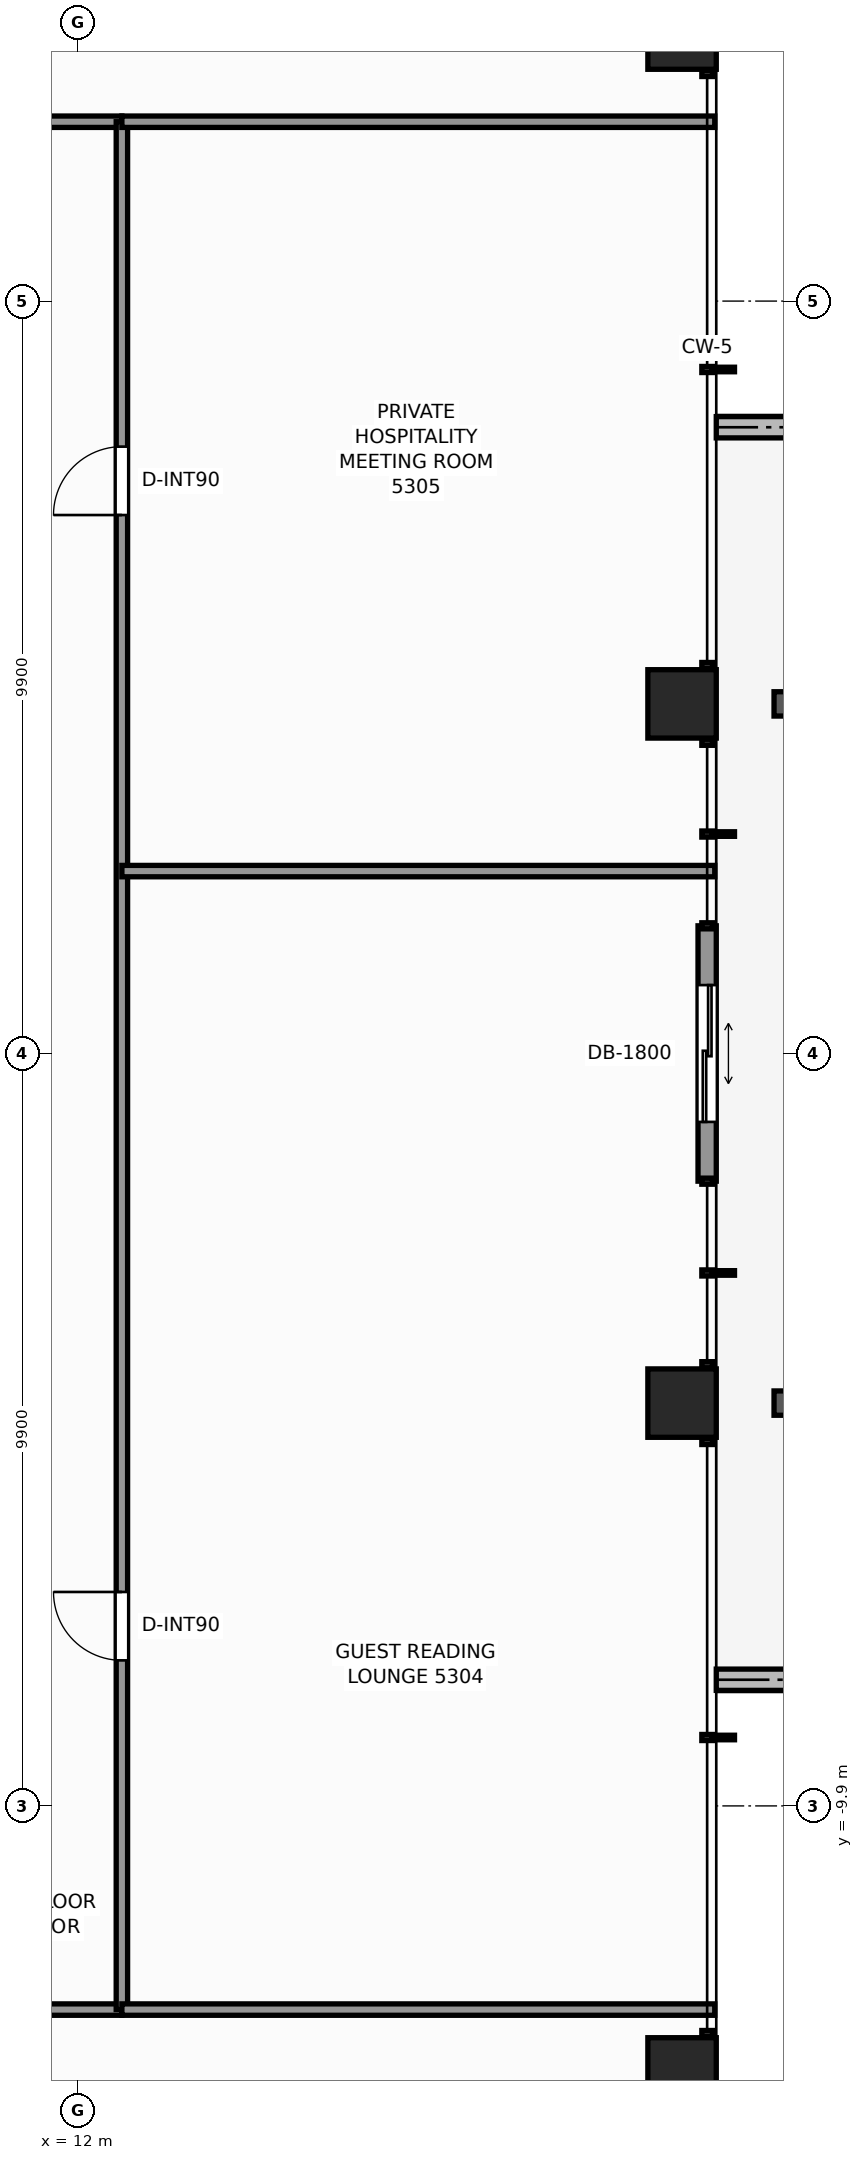
"""IFC4 building model, lengths in metres.
Left out: names, types, materials, properties, quantities, classifications, styles, units other than length and angle.
Written with IfcOpenShell. Run it as: python <this file> out.ifc"""

import sys

from ifc_helpers import new_model, si_unit, direction, frame, frame_2d, origin, origin_2d, place, context, subcontext, project, spatial, rectangle, extrude, element, fill, save


model = new_model("IFC4")
c1 = context("Model", 3, precision=1e-05, world=origin(), true_north=direction((0.0, 1.0)))
c2 = subcontext(c1, "Body", "Model", "MODEL_VIEW")
j1 = project(units=[si_unit("LENGTHUNIT", "METRE"), si_unit("PLANEANGLEUNIT", "RADIAN")], contexts=[c1])
p1 = place(None, origin())
s1 = spatial("IfcSite", under=j1, at=p1, CompositionType="ELEMENT")
p2 = place(p1, origin())
s2 = spatial("IfcBuilding", under=s1, at=p2, CompositionType="ELEMENT")
p3 = place(p2, frame((0.0, 0.0, 183.3)))
s3 = spatial("IfcBuildingStorey", under=s2, at=p3, CompositionType="ELEMENT", Elevation=183.3)
for number, where, z_axis, x_axis in (
    (1, (19.95, -13.4, 0.0), (0.0, 0.0, 1.0), (1.0, 0.0, 0.0)),
    (2, (19.95, -4.6, 0.0), (0.0, 0.0, 1.0), (1.0, 0.0, 0.0)),
    (3, (19.95, 4.6, 0.0), (0.0, 0.0, 1.0), (1.0, 0.0, 0.0)),
    (4, (19.95, 13.4, 0.0), (0.0, 0.0, 1.0), (1.0, 0.0, 0.0)),
):
    element("IfcColumn", number, at=place(p3, frame(where, z_axis=z_axis, x_axis=x_axis)), inside=s3, PredefinedType="COLUMN", context=c2, shape_type="SweptSolid", body=[
        extrude(rectangle(XDim=0.9, YDim=0.9, at=origin_2d()), origin(), (0.0, 0.0, 1.0), 3.3),
    ])
p4 = place(p3, frame((22.105, 8.24, -0.04), z_axis=(0.0, 0.0, 1.0), x_axis=(-1.0, 0.0, 0.0)))
e5 = element("IfcWall", 5, at=p4, inside=s3, PredefinedType="PARAPET", context=c2, shape_type="SweptSolid", body=[
    extrude(rectangle(XDim=1.705, YDim=0.28, at=frame_2d((0.853, 0.0))), origin(), (0.0, 0.0, 1.0), 0.42),
])
p5 = place(p3, frame((20.4, -8.24, -0.04), z_axis=(0.0, 0.0, 1.0), x_axis=(1.0, 0.0, 0.0)))
e6 = element("IfcWall", 6, at=p5, inside=s3, PredefinedType="PARAPET", context=c2, shape_type="SweptSolid", body=[
    extrude(rectangle(XDim=2.975, YDim=0.28, at=frame_2d((1.487, 0.0))), origin(), (0.0, 0.0, 1.0), 0.42),
])
p6 = place(p3, frame((20.28, 1.68, 0.0), z_axis=(0.0, 0.0, 1.0), x_axis=(0.0, -1.0, 0.0)))
e7 = element("IfcWall", 7, at=p6, inside=s3, PredefinedType="STANDARD", context=c2, shape_type="SweptSolid", body=[
    extrude(rectangle(XDim=3.36, YDim=0.24, at=frame_2d((1.68, 0.0))), origin(), (0.0, 0.0, 1.0), 3.08),
])
p7 = place(p6, frame((0.78, 0.0, 0.0)))
e8 = element("IfcOpeningElement", 8, at=p7, cuts=e7, PredefinedType="OPENING", context=c2, shape_type="SweptSolid", body=[
    extrude(rectangle(XDim=1.8, YDim=2.2, at=frame_2d((0.9, 1.1))), frame((0.0, 0.13, 0.0), z_axis=(0.0, -1.0, 0.0), x_axis=(1.0, 0.0, 0.0)), (0.0, 0.0, 1.0), 0.26),
])
p8 = place(p3, frame((-12.26, -12.58, 0.0), z_axis=(0.0, 0.0, 1.0), x_axis=(1.0, 0.0, 0.0)))
e9 = element("IfcWall", 9, at=p8, inside=s3, PredefinedType="PARTITIONING", context=c2, shape_type="SweptSolid", body=[
    extrude(rectangle(XDim=24.84, YDim=0.15, at=frame_2d((12.42, 0.0))), origin(), (0.0, 0.0, 1.0), 2.369),
])
p9 = place(p8, frame((3.203, 0.0, 0.0)))
e10 = element("IfcOpeningElement", 10, at=p9, cuts=e9, PredefinedType="OPENING", context=c2, shape_type="SweptSolid", body=[
    extrude(rectangle(XDim=0.9, YDim=2.06, at=frame_2d((0.45, 1.03))), frame((0.0, 0.085, 0.0), z_axis=(0.0, -1.0, 0.0), x_axis=(1.0, 0.0, 0.0)), (0.0, 0.0, 1.0), 0.17),
])
p10 = place(p8, frame((9.78, 0.0, 0.0)))
e11 = element("IfcOpeningElement", 11, at=p10, cuts=e9, PredefinedType="OPENING", context=c2, shape_type="SweptSolid", body=[
    extrude(rectangle(XDim=0.9, YDim=2.06, at=frame_2d((0.45, 1.03))), frame((0.0, 0.085, 0.0), z_axis=(0.0, -1.0, 0.0), x_axis=(1.0, 0.0, 0.0)), (0.0, 0.0, 1.0), 0.17),
])
p11 = place(p8, frame((19.345, 0.0, 0.0)))
e12 = element("IfcOpeningElement", 12, at=p11, cuts=e9, PredefinedType="OPENING", context=c2, shape_type="SweptSolid", body=[
    extrude(rectangle(XDim=0.9, YDim=2.06, at=frame_2d((0.45, 1.03))), frame((0.0, 0.085, 0.0), z_axis=(0.0, -1.0, 0.0), x_axis=(1.0, 0.0, 0.0)), (0.0, 0.0, 1.0), 0.17),
])
p12 = place(p3, frame((-12.26, 12.26, 0.0), z_axis=(0.0, 0.0, 1.0), x_axis=(1.0, 0.0, 0.0)))
e13 = element("IfcWall", 13, at=p12, inside=s3, PredefinedType="PARTITIONING", context=c2, shape_type="SweptSolid", body=[
    extrude(rectangle(XDim=24.84, YDim=0.15, at=frame_2d((12.42, 0.0))), origin(), (0.0, 0.0, 1.0), 2.369),
])
p13 = place(p12, frame((4.275, 0.0, 0.0)))
e14 = element("IfcOpeningElement", 14, at=p13, cuts=e13, PredefinedType="OPENING", context=c2, shape_type="SweptSolid", body=[
    extrude(rectangle(XDim=0.9, YDim=2.06, at=frame_2d((0.45, 1.03))), frame((0.0, 0.085, 0.0), z_axis=(0.0, -1.0, 0.0), x_axis=(1.0, 0.0, 0.0)), (0.0, 0.0, 1.0), 0.17),
])
p14 = place(p12, frame((19.345, 0.0, 0.0)))
e15 = element("IfcOpeningElement", 15, at=p14, cuts=e13, PredefinedType="OPENING", context=c2, shape_type="SweptSolid", body=[
    extrude(rectangle(XDim=0.9, YDim=2.06, at=frame_2d((0.45, 1.03))), frame((0.0, 0.085, 0.0), z_axis=(0.0, -1.0, 0.0), x_axis=(1.0, 0.0, 0.0)), (0.0, 0.0, 1.0), 0.17),
])
p15 = place(p3, frame((12.58, -12.58, 0.0), z_axis=(0.0, 0.0, 1.0), x_axis=(0.0, 1.0, 0.0)))
e16 = element("IfcWall", 16, at=p15, inside=s3, PredefinedType="PARTITIONING", context=c2, shape_type="SweptSolid", body=[
    extrude(rectangle(XDim=24.84, YDim=0.15, at=frame_2d((12.42, 0.0))), origin(), (0.0, 0.0, 1.0), 2.369),
])
p16 = place(p15, frame((4.595, 0.0, 0.0)))
e17 = element("IfcOpeningElement", 17, at=p16, cuts=e16, PredefinedType="OPENING", context=c2, shape_type="SweptSolid", body=[
    extrude(rectangle(XDim=0.9, YDim=2.06, at=frame_2d((0.45, 1.03))), frame((0.0, 0.085, 0.0), z_axis=(0.0, -1.0, 0.0), x_axis=(1.0, 0.0, 0.0)), (0.0, 0.0, 1.0), 0.17),
])
p17 = place(p15, frame((19.665, 0.0, 0.0)))
e18 = element("IfcOpeningElement", 18, at=p17, cuts=e16, PredefinedType="OPENING", context=c2, shape_type="SweptSolid", body=[
    extrude(rectangle(XDim=0.9, YDim=2.06, at=frame_2d((0.45, 1.03))), frame((0.0, 0.085, 0.0), z_axis=(0.0, -1.0, 0.0), x_axis=(1.0, 0.0, 0.0)), (0.0, 0.0, 1.0), 0.17),
])
for number, where, z_axis, x_axis in (
    (19, (12.58, -12.58, 0.0), (0.0, 0.0, 1.0), (1.0, 0.0, 0.0)),
    (20, (12.58, 12.26, 0.0), (0.0, 0.0, 1.0), (1.0, 0.0, 0.0)),
):
    element("IfcWall", number, at=place(p3, frame(where, z_axis=z_axis, x_axis=x_axis)), inside=s3, PredefinedType="PARTITIONING", context=c2, shape_type="SweptSolid", body=[
        extrude(rectangle(XDim=7.8, YDim=0.15, at=frame_2d((3.9, 0.0))), origin(), (0.0, 0.0, 1.0), 2.369),
    ])
p18 = place(p3, frame((12.58, 2.4, 0.0), z_axis=(0.0, 0.0, 1.0), x_axis=(1.0, 0.0, 0.0)))
e21 = element("IfcWall", 21, at=p18, inside=s3, PredefinedType="PARTITIONING", context=c2, shape_type="SweptSolid", body=[
    extrude(rectangle(XDim=7.8, YDim=0.15, at=frame_2d((3.9, 0.0))), origin(), (0.0, 0.0, 1.0), 2.453),
])
p19 = place(p7, origin())
e22 = element("IfcDoor", 22, at=p19, inside=s3, OperationType="DOUBLE_DOOR_SLIDING", PredefinedType="DOOR", context=c2, shape_type="SweptSolid", body=[
    extrude(rectangle(XDim=1.8, YDim=2.2, at=frame_2d((0.9, 1.1))), frame((0.0, 0.025, 0.0), z_axis=(0.0, -1.0, 0.0), x_axis=(1.0, 0.0, 0.0)), (0.0, 0.0, 1.0), 0.05),
])
fill(e8, e22)
p20 = place(p16, origin())
e23 = element("IfcDoor", 23, at=p20, inside=s3, OperationType="SINGLE_SWING_RIGHT", PredefinedType="DOOR", context=c2, shape_type="SweptSolid", body=[
    extrude(rectangle(XDim=0.9, YDim=2.06, at=frame_2d((0.45, 1.03))), frame((0.0, 0.025, 0.0), z_axis=(0.0, -1.0, 0.0), x_axis=(1.0, 0.0, 0.0)), (0.0, 0.0, 1.0), 0.05),
])
fill(e17, e23)
p21 = place(p17, origin())
e24 = element("IfcDoor", 24, at=p21, inside=s3, OperationType="SINGLE_SWING_LEFT", PredefinedType="DOOR", context=c2, shape_type="SweptSolid", body=[
    extrude(rectangle(XDim=0.9, YDim=2.06, at=frame_2d((0.45, 1.03))), frame((0.0, 0.025, 0.0), z_axis=(0.0, -1.0, 0.0), x_axis=(1.0, 0.0, 0.0)), (0.0, 0.0, 1.0), 0.05),
])
fill(e18, e24)
save(model, sys.argv[1])
